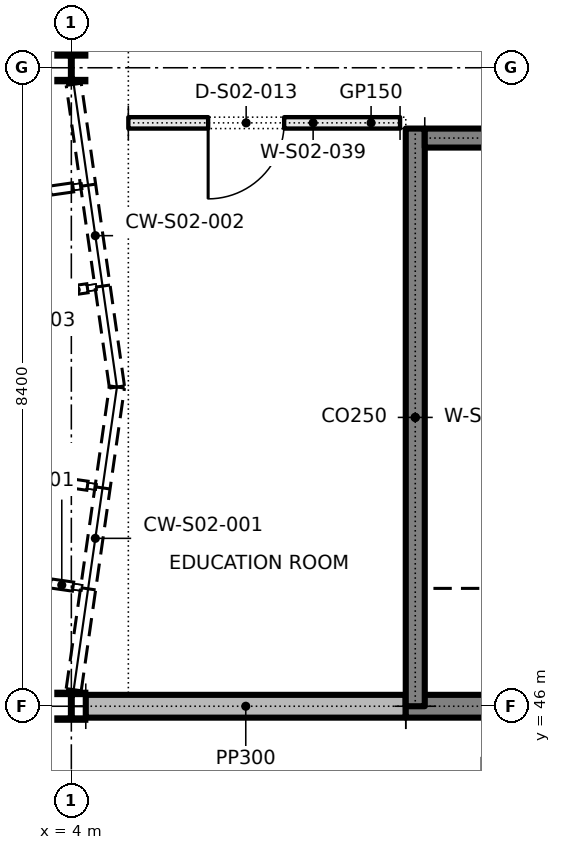
"""IFC4 building model, lengths in metres.
Left out: names, types, materials, properties, quantities, classifications, styles, units other than length and angle.
Written with IfcOpenShell. Run it as: python <this file> out.ifc"""

import sys

from ifc_helpers import new_model, si_unit, direction, frame, frame_2d, origin, origin_2d, place, context, subcontext, project, spatial, rectangle, i_section, extrude, element, fill, save


model = new_model("IFC4")
c1 = context("Model", 3, precision=1e-05, world=origin(), true_north=direction((0.0, 1.0)))
c2 = subcontext(c1, "Body", "Model", "MODEL_VIEW")
j1 = project(units=[si_unit("LENGTHUNIT", "METRE"), si_unit("PLANEANGLEUNIT", "RADIAN")], contexts=[c1])
p1 = place(None, origin())
s1 = spatial("IfcSite", under=j1, at=p1, CompositionType="ELEMENT")
p2 = place(p1, origin())
s2 = spatial("IfcBuilding", under=s1, at=p2, CompositionType="ELEMENT")
p3 = place(p2, frame((0.0, 0.0, 10.2)))
s3 = spatial("IfcBuildingStorey", under=s2, at=p3, CompositionType="ELEMENT", Elevation=10.2)
for number, where, z_axis, x_axis in (
    (1, (4.0, 46.0, 0.0), (0.0, 0.0, 1.0), (1.0, 0.0, 0.0)),
    (2, (4.0, 54.4, 0.0), (0.0, 0.0, 1.0), (1.0, 0.0, 0.0)),
):
    element("IfcColumn", number, at=place(p3, frame(where, z_axis=z_axis, x_axis=x_axis)), inside=s3, PredefinedType="COLUMN", context=c2, shape_type="SweptSolid", body=[
        extrude(i_section(OverallWidth=0.368, OverallDepth=0.356, WebThickness=0.011, FlangeThickness=0.018, FilletRadius=0.015, at=origin_2d()), origin(), (0.0, 0.0, 1.0), 4.8),
    ])
p4 = place(p3, frame((4.19, 46.0, 0.0), z_axis=(0.0, 0.0, 1.0), x_axis=(1.0, 0.0, 0.0)))
e3 = element("IfcWall", 3, at=p4, inside=s3, PredefinedType="SOLIDWALL", context=c2, shape_type="SweptSolid", body=[
    extrude(rectangle(XDim=4.21, YDim=0.3, at=frame_2d((2.105, 0.0))), origin(), (0.0, 0.0, 1.0), 4.8),
])
p5 = place(p3, frame((8.4, 46.0, 0.0), z_axis=(0.0, 0.0, 1.0), x_axis=(1.0, 0.0, 0.0)))
e4 = element("IfcWall", 4, at=p5, inside=s3, PredefinedType="SOLIDWALL", context=c2, shape_type="SweptSolid", body=[
    extrude(rectangle(XDim=3.775, YDim=0.3, at=frame_2d((1.888, 0.0))), origin(), (0.0, 0.0, 1.0), 4.8),
])
p6 = place(p3, frame((8.525, 46.0, 0.0), z_axis=(0.0, 0.0, 1.0), x_axis=(0.0, 1.0, 0.0)))
e5 = element("IfcWall", 5, at=p6, inside=s3, PredefinedType="SHEAR", context=c2, shape_type="SweptSolid", body=[
    extrude(rectangle(XDim=7.6, YDim=0.25, at=frame_2d((3.8, 0.0))), origin(), (0.0, 0.0, 1.0), 4.8),
])
p7 = place(p3, frame((8.65, 53.475, 0.0), z_axis=(0.0, 0.0, 1.0), x_axis=(1.0, 0.0, 0.0)))
e6 = element("IfcWall", 6, at=p7, inside=s3, PredefinedType="SHEAR", context=c2, shape_type="SweptSolid", body=[
    extrude(rectangle(XDim=3.25, YDim=0.25, at=frame_2d((1.625, 0.0))), origin(), (0.0, 0.0, 1.0), 4.8),
])
p8 = place(p3, frame((4.75, 53.675, 0.0), z_axis=(0.0, 0.0, 1.0), x_axis=(1.0, 0.0, 0.0)))
e7 = element("IfcWall", 7, at=p8, inside=s3, PredefinedType="PARTITIONING", context=c2, shape_type="SweptSolid", body=[
    extrude(rectangle(XDim=3.575, YDim=0.15, at=frame_2d((1.788, 0.0))), origin(), (0.0, 0.0, 1.0), 4.8),
])
p9 = place(p8, frame((1.05, 0.0, 0.0)))
e8 = element("IfcOpeningElement", 8, at=p9, cuts=e7, PredefinedType="OPENING", context=c2, shape_type="SweptSolid", body=[
    extrude(rectangle(XDim=1.0, YDim=2.1, at=frame_2d((0.5, 1.05))), frame((0.0, 0.085, 0.0), z_axis=(0.0, -1.0, 0.0), x_axis=(1.0, 0.0, 0.0)), (0.0, 0.0, 1.0), 0.17),
])
p10 = place(p9, frame((1.0, 0.0, 0.0), z_axis=(0.0, 0.0, 1.0), x_axis=(-1.0, 0.0, 0.0)))
e9 = element("IfcDoor", 9, at=p10, inside=s3, OperationType="SINGLE_SWING_RIGHT", PredefinedType="DOOR", context=c2, shape_type="SweptSolid", body=[
    extrude(rectangle(XDim=1.0, YDim=2.1, at=frame_2d((0.5, 1.05))), frame((0.0, 0.025, 0.0), z_axis=(0.0, -1.0, 0.0), x_axis=(1.0, 0.0, 0.0)), (0.0, 0.0, 1.0), 0.05),
])
fill(e8, e9)
save(model, sys.argv[1])
